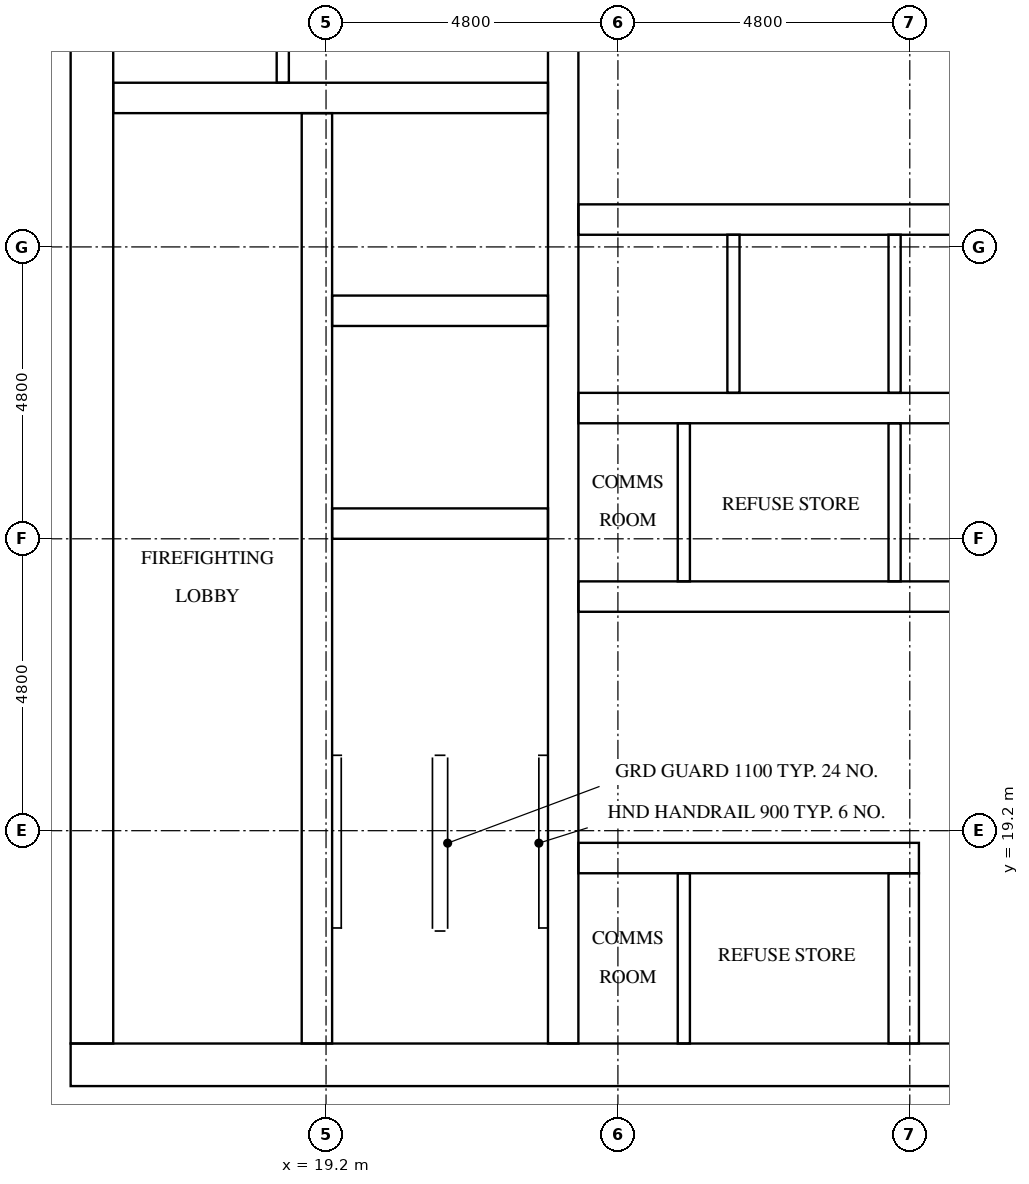
"""IFC4 building model, lengths in metres.
Left out: names, types, materials, properties, quantities, classifications, styles, units other than length and angle.
Written with IfcOpenShell. Run it as: python <this file> out.ifc"""

import sys

from ifc_helpers import new_model, si_unit, direction, frame, frame_2d, origin, place, context, subcontext, project, spatial, rectangle, extrude, element, fill, save


model = new_model("IFC4")
c1 = context("Model", 3, precision=1e-05, world=origin(), true_north=direction((0.0, 1.0)))
c2 = subcontext(c1, "Body", "Model", "MODEL_VIEW")
j1 = project(units=[si_unit("LENGTHUNIT", "METRE"), si_unit("PLANEANGLEUNIT", "RADIAN")], contexts=[c1])
p1 = place(None, origin())
s1 = spatial("IfcSite", under=j1, at=p1, CompositionType="ELEMENT")
p2 = place(p1, origin())
s2 = spatial("IfcBuilding", under=s1, at=p2, CompositionType="ELEMENT")
p3 = place(p2, frame((0.0, 0.0, 212.3)))
s3 = spatial("IfcBuildingStorey", under=s2, at=p3, CompositionType="ELEMENT", Elevation=212.3)
p4 = place(p3, frame((15.0, 15.35, 0.0), z_axis=(0.0, 0.0, 1.0), x_axis=(1.0, 0.0, 0.0)))
e1 = element("IfcWall", 1, at=p4, inside=s3, PredefinedType="SHEAR", context=c2, shape_type="SweptSolid", body=[
    extrude(rectangle(XDim=32.4, YDim=0.7, at=frame_2d((16.2, 0.0))), origin(), (0.0, 0.0, 1.0), 3.2),
])
p5 = place(p4, frame((15.3, 0.0, 0.0)))
e2 = element("IfcOpeningElement", 2, at=p5, cuts=e1, PredefinedType="OPENING", context=c2, shape_type="SweptSolid", body=[
    extrude(rectangle(XDim=1.8, YDim=2.1, at=frame_2d((0.9, 1.05))), frame((0.0, 0.36, 0.0), z_axis=(0.0, -1.0, 0.0), x_axis=(1.0, 0.0, 0.0)), (0.0, 0.0, 1.0), 0.72),
])
p6 = place(p3, frame((15.35, 15.7, 0.0), z_axis=(0.0, 0.0, 1.0), x_axis=(0.0, 1.0, 0.0)))
e3 = element("IfcWall", 3, at=p6, inside=s3, PredefinedType="SHEAR", context=c2, shape_type="SweptSolid", body=[
    extrude(rectangle(XDim=21.4, YDim=0.7, at=frame_2d((10.7, 0.0))), origin(), (0.0, 0.0, 1.0), 3.2),
])
p7 = place(p6, frame((5.06, 0.0, 0.0)))
e4 = element("IfcOpeningElement", 4, at=p7, cuts=e3, PredefinedType="OPENING", context=c2, shape_type="SweptSolid", body=[
    extrude(rectangle(XDim=1.2, YDim=2.1, at=frame_2d((0.6, 1.05))), frame((0.0, 0.36, 0.0), z_axis=(0.0, -1.0, 0.0), x_axis=(1.0, 0.0, 0.0)), (0.0, 0.0, 1.0), 0.72),
])
p8 = place(p3, frame((19.05, 15.7, 0.0), z_axis=(0.0, 0.0, 1.0), x_axis=(0.0, 1.0, 0.0)))
e5 = element("IfcWall", 5, at=p8, inside=s3, PredefinedType="SHEAR", context=c2, shape_type="SweptSolid", body=[
    extrude(rectangle(XDim=15.3, YDim=0.5, at=frame_2d((7.65, 0.0))), origin(), (0.0, 0.0, 1.0), 3.2),
])
p9 = place(p8, frame((9.75, 0.0, 0.0)))
e6 = element("IfcOpeningElement", 6, at=p9, cuts=e5, PredefinedType="OPENING", context=c2, shape_type="SweptSolid", body=[
    extrude(rectangle(XDim=1.1, YDim=2.1, at=frame_2d((0.55, 1.05))), frame((0.0, 0.26, 0.0), z_axis=(0.0, -1.0, 0.0), x_axis=(1.0, 0.0, 0.0)), (0.0, 0.0, 1.0), 0.52),
])
p10 = place(p8, frame((13.25, 0.0, 0.0)))
e7 = element("IfcOpeningElement", 7, at=p10, cuts=e5, PredefinedType="OPENING", context=c2, shape_type="SweptSolid", body=[
    extrude(rectangle(XDim=1.1, YDim=2.1, at=frame_2d((0.55, 1.05))), frame((0.0, 0.26, 0.0), z_axis=(0.0, -1.0, 0.0), x_axis=(1.0, 0.0, 0.0)), (0.0, 0.0, 1.0), 0.52),
])
p11 = place(p8, frame((0.5, 0.0, 0.0)))
e8 = element("IfcOpeningElement", 8, at=p11, cuts=e5, PredefinedType="OPENING", context=c2, shape_type="SweptSolid", body=[
    extrude(rectangle(XDim=1.2, YDim=2.1, at=frame_2d((0.6, 1.05))), frame((0.0, 0.26, 0.0), z_axis=(0.0, -1.0, 0.0), x_axis=(1.0, 0.0, 0.0)), (0.0, 0.0, 1.0), 0.52),
])
p12 = place(p3, frame((23.1, 15.7, 0.0), z_axis=(0.0, 0.0, 1.0), x_axis=(0.0, 1.0, 0.0)))
e9 = element("IfcWall", 9, at=p12, inside=s3, PredefinedType="SHEAR", context=c2, shape_type="SweptSolid", body=[
    extrude(rectangle(XDim=21.4, YDim=0.5, at=frame_2d((10.7, 0.0))), origin(), (0.0, 0.0, 1.0), 3.2),
])
for number, where, z_axis, x_axis in (
    (10, (19.3, 24.25, 0.0), (0.0, 0.0, 1.0), (1.0, 0.0, 0.0)),
    (11, (19.3, 27.75, 0.0), (0.0, 0.0, 1.0), (1.0, 0.0, 0.0)),
):
    element("IfcWall", number, at=place(p3, frame(where, z_axis=z_axis, x_axis=x_axis)), inside=s3, PredefinedType="SHEAR", context=c2, shape_type="SweptSolid", body=[
        extrude(rectangle(XDim=3.55, YDim=0.5, at=frame_2d((1.775, 0.0))), origin(), (0.0, 0.0, 1.0), 3.2),
    ])
p13 = place(p3, frame((15.7, 31.25, 0.0), z_axis=(0.0, 0.0, 1.0), x_axis=(1.0, 0.0, 0.0)))
e12 = element("IfcWall", 12, at=p13, inside=s3, PredefinedType="SHEAR", context=c2, shape_type="SweptSolid", body=[
    extrude(rectangle(XDim=7.15, YDim=0.5, at=frame_2d((3.575, 0.0))), origin(), (0.0, 0.0, 1.0), 3.2),
])
p14 = place(p3, frame((23.35, 18.75, 0.0), z_axis=(0.0, 0.0, 1.0), x_axis=(1.0, 0.0, 0.0)))
e13 = element("IfcWall", 13, at=p14, inside=s3, PredefinedType="SHEAR", context=c2, shape_type="SweptSolid", body=[
    extrude(rectangle(XDim=5.6, YDim=0.5, at=frame_2d((2.8, 0.0))), origin(), (0.0, 0.0, 1.0), 3.2),
])
p15 = place(p14, frame((0.317, 0.0, 0.0)))
e14 = element("IfcOpeningElement", 14, at=p15, cuts=e13, PredefinedType="OPENING", context=c2, shape_type="SweptSolid", body=[
    extrude(rectangle(XDim=1.0, YDim=2.1, at=frame_2d((0.5, 1.05))), frame((0.0, 0.26, 0.0), z_axis=(0.0, -1.0, 0.0), x_axis=(1.0, 0.0, 0.0)), (0.0, 0.0, 1.0), 0.52),
])
p16 = place(p14, frame((2.967, 0.0, 0.0)))
e15 = element("IfcOpeningElement", 15, at=p16, cuts=e13, PredefinedType="OPENING", context=c2, shape_type="SweptSolid", body=[
    extrude(rectangle(XDim=1.0, YDim=2.1, at=frame_2d((0.5, 1.05))), frame((0.0, 0.26, 0.0), z_axis=(0.0, -1.0, 0.0), x_axis=(1.0, 0.0, 0.0)), (0.0, 0.0, 1.0), 0.52),
])
p17 = place(p3, frame((23.35, 23.05, 0.0), z_axis=(0.0, 0.0, 1.0), x_axis=(1.0, 0.0, 0.0)))
e16 = element("IfcWall", 16, at=p17, inside=s3, PredefinedType="SHEAR", context=c2, shape_type="SweptSolid", body=[
    extrude(rectangle(XDim=15.7, YDim=0.5, at=frame_2d((7.85, 0.0))), origin(), (0.0, 0.0, 1.0), 3.2),
])
p18 = place(p17, frame((0.317, 0.0, 0.0)))
e17 = element("IfcOpeningElement", 17, at=p18, cuts=e16, PredefinedType="OPENING", context=c2, shape_type="SweptSolid", body=[
    extrude(rectangle(XDim=1.0, YDim=2.1, at=frame_2d((0.5, 1.05))), frame((0.0, 0.26, 0.0), z_axis=(0.0, -1.0, 0.0), x_axis=(1.0, 0.0, 0.0)), (0.0, 0.0, 1.0), 0.52),
])
p19 = place(p17, frame((2.967, 0.0, 0.0)))
e18 = element("IfcOpeningElement", 18, at=p19, cuts=e16, PredefinedType="OPENING", context=c2, shape_type="SweptSolid", body=[
    extrude(rectangle(XDim=1.0, YDim=2.1, at=frame_2d((0.5, 1.05))), frame((0.0, 0.26, 0.0), z_axis=(0.0, -1.0, 0.0), x_axis=(1.0, 0.0, 0.0)), (0.0, 0.0, 1.0), 0.52),
])
p20 = place(p17, frame((10.917, 0.0, 0.0)))
e19 = element("IfcOpeningElement", 19, at=p20, cuts=e16, PredefinedType="OPENING", context=c2, shape_type="SweptSolid", body=[
    extrude(rectangle(XDim=1.0, YDim=2.1, at=frame_2d((0.5, 1.05))), frame((0.0, 0.26, 0.0), z_axis=(0.0, -1.0, 0.0), x_axis=(1.0, 0.0, 0.0)), (0.0, 0.0, 1.0), 0.52),
])
p21 = place(p17, frame((13.567, 0.0, 0.0)))
e20 = element("IfcOpeningElement", 20, at=p21, cuts=e16, PredefinedType="OPENING", context=c2, shape_type="SweptSolid", body=[
    extrude(rectangle(XDim=1.0, YDim=2.1, at=frame_2d((0.5, 1.05))), frame((0.0, 0.26, 0.0), z_axis=(0.0, -1.0, 0.0), x_axis=(1.0, 0.0, 0.0)), (0.0, 0.0, 1.0), 0.52),
])
p22 = place(p3, frame((23.35, 26.15, 0.0), z_axis=(0.0, 0.0, 1.0), x_axis=(1.0, 0.0, 0.0)))
e21 = element("IfcWall", 21, at=p22, inside=s3, PredefinedType="SHEAR", context=c2, shape_type="SweptSolid", body=[
    extrude(rectangle(XDim=15.7, YDim=0.5, at=frame_2d((7.85, 0.0))), origin(), (0.0, 0.0, 1.0), 3.2),
])
p23 = place(p3, frame((23.35, 29.25, 0.0), z_axis=(0.0, 0.0, 1.0), x_axis=(1.0, 0.0, 0.0)))
e22 = element("IfcWall", 22, at=p23, inside=s3, PredefinedType="SHEAR", context=c2, shape_type="SweptSolid", body=[
    extrude(rectangle(XDim=15.7, YDim=0.5, at=frame_2d((7.85, 0.0))), origin(), (0.0, 0.0, 1.0), 3.2),
])
p24 = place(p23, frame((0.675, 0.0, 0.0)))
e23 = element("IfcOpeningElement", 23, at=p24, cuts=e22, PredefinedType="OPENING", context=c2, shape_type="SweptSolid", body=[
    extrude(rectangle(XDim=1.1, YDim=2.1, at=frame_2d((0.55, 1.05))), frame((0.0, 0.26, 0.0), z_axis=(0.0, -1.0, 0.0), x_axis=(1.0, 0.0, 0.0)), (0.0, 0.0, 1.0), 0.52),
])
p25 = place(p23, frame((3.325, 0.0, 0.0)))
e24 = element("IfcOpeningElement", 24, at=p25, cuts=e22, PredefinedType="OPENING", context=c2, shape_type="SweptSolid", body=[
    extrude(rectangle(XDim=1.1, YDim=2.1, at=frame_2d((0.55, 1.05))), frame((0.0, 0.26, 0.0), z_axis=(0.0, -1.0, 0.0), x_axis=(1.0, 0.0, 0.0)), (0.0, 0.0, 1.0), 0.52),
])
p26 = place(p23, frame((5.975, 0.0, 0.0)))
e25 = element("IfcOpeningElement", 25, at=p26, cuts=e22, PredefinedType="OPENING", context=c2, shape_type="SweptSolid", body=[
    extrude(rectangle(XDim=1.1, YDim=2.1, at=frame_2d((0.55, 1.05))), frame((0.0, 0.26, 0.0), z_axis=(0.0, -1.0, 0.0), x_axis=(1.0, 0.0, 0.0)), (0.0, 0.0, 1.0), 0.52),
])
p27 = place(p23, frame((8.625, 0.0, 0.0)))
e26 = element("IfcOpeningElement", 26, at=p27, cuts=e22, PredefinedType="OPENING", context=c2, shape_type="SweptSolid", body=[
    extrude(rectangle(XDim=1.1, YDim=2.1, at=frame_2d((0.55, 1.05))), frame((0.0, 0.26, 0.0), z_axis=(0.0, -1.0, 0.0), x_axis=(1.0, 0.0, 0.0)), (0.0, 0.0, 1.0), 0.52),
])
p28 = place(p23, frame((11.275, 0.0, 0.0)))
e27 = element("IfcOpeningElement", 27, at=p28, cuts=e22, PredefinedType="OPENING", context=c2, shape_type="SweptSolid", body=[
    extrude(rectangle(XDim=1.1, YDim=2.1, at=frame_2d((0.55, 1.05))), frame((0.0, 0.26, 0.0), z_axis=(0.0, -1.0, 0.0), x_axis=(1.0, 0.0, 0.0)), (0.0, 0.0, 1.0), 0.52),
])
p29 = place(p23, frame((13.925, 0.0, 0.0)))
e28 = element("IfcOpeningElement", 28, at=p29, cuts=e22, PredefinedType="OPENING", context=c2, shape_type="SweptSolid", body=[
    extrude(rectangle(XDim=1.1, YDim=2.1, at=frame_2d((0.55, 1.05))), frame((0.0, 0.26, 0.0), z_axis=(0.0, -1.0, 0.0), x_axis=(1.0, 0.0, 0.0)), (0.0, 0.0, 1.0), 0.52),
])
p30 = place(p3, frame((28.7, 15.7, 0.0), z_axis=(0.0, 0.0, 1.0), x_axis=(0.0, 1.0, 0.0)))
e29 = element("IfcWall", 29, at=p30, inside=s3, PredefinedType="SHEAR", context=c2, shape_type="SweptSolid", body=[
    extrude(rectangle(XDim=2.8, YDim=0.5, at=frame_2d((1.4, 0.0))), origin(), (0.0, 0.0, 1.0), 3.2),
])
p31 = place(p3, frame((25.9, 26.4, 0.0), z_axis=(0.0, 0.0, 1.0), x_axis=(0.0, 1.0, 0.0)))
e30 = element("IfcWall", 30, at=p31, inside=s3, PredefinedType="SOLIDWALL", context=c2, shape_type="SweptSolid", body=[
    extrude(rectangle(XDim=2.6, YDim=0.2, at=frame_2d((1.3, 0.0))), origin(), (0.0, 0.0, 1.0), 3.2),
])
p32 = place(p3, frame((28.55, 23.3, 0.0), z_axis=(0.0, 0.0, 1.0), x_axis=(0.0, 1.0, 0.0)))
e31 = element("IfcWall", 31, at=p32, inside=s3, PredefinedType="SOLIDWALL", context=c2, shape_type="SweptSolid", body=[
    extrude(rectangle(XDim=2.6, YDim=0.2, at=frame_2d((1.3, 0.0))), origin(), (0.0, 0.0, 1.0), 3.2),
])
p33 = place(p3, frame((28.55, 26.4, 0.0), z_axis=(0.0, 0.0, 1.0), x_axis=(0.0, 1.0, 0.0)))
e32 = element("IfcWall", 32, at=p33, inside=s3, PredefinedType="SOLIDWALL", context=c2, shape_type="SweptSolid", body=[
    extrude(rectangle(XDim=2.6, YDim=0.2, at=frame_2d((1.3, 0.0))), origin(), (0.0, 0.0, 1.0), 3.2),
])
p34 = place(p3, frame((18.489, 31.5, 0.0), z_axis=(0.0, 0.0, 1.0), x_axis=(0.0, 1.0, 0.0)))
e33 = element("IfcWall", 33, at=p34, inside=s3, PredefinedType="PARTITIONING", context=c2, shape_type="SweptSolid", body=[
    extrude(rectangle(XDim=5.6, YDim=0.2, at=frame_2d((2.8, 0.0))), origin(), (0.0, 0.0, 1.0), 3.2),
])
p35 = place(p3, frame((25.084, 23.3, 0.0), z_axis=(0.0, 0.0, 1.0), x_axis=(0.0, 1.0, 0.0)))
e34 = element("IfcWall", 34, at=p35, inside=s3, PredefinedType="PARTITIONING", context=c2, shape_type="SweptSolid", body=[
    extrude(rectangle(XDim=2.6, YDim=0.2, at=frame_2d((1.3, 0.0))), origin(), (0.0, 0.0, 1.0), 3.2),
])
p36 = place(p3, frame((25.084, 15.7, 0.0), z_axis=(0.0, 0.0, 1.0), x_axis=(0.0, 1.0, 0.0)))
e35 = element("IfcWall", 35, at=p36, inside=s3, PredefinedType="PARTITIONING", context=c2, shape_type="SweptSolid", body=[
    extrude(rectangle(XDim=2.8, YDim=0.2, at=frame_2d((1.4, 0.0))), origin(), (0.0, 0.0, 1.0), 3.2),
])
p37 = place(p24, origin())
e36 = element("IfcDoor", 36, at=p37, inside=s3, OperationType="DOUBLE_DOOR_SLIDING", PredefinedType="DOOR", context=c2, shape_type="SweptSolid", body=[
    extrude(rectangle(XDim=1.1, YDim=2.1, at=frame_2d((0.55, 1.05))), frame((0.0, 0.025, 0.0), z_axis=(0.0, -1.0, 0.0), x_axis=(1.0, 0.0, 0.0)), (0.0, 0.0, 1.0), 0.05),
])
fill(e23, e36)
p38 = place(p25, origin())
e37 = element("IfcDoor", 37, at=p38, inside=s3, OperationType="DOUBLE_DOOR_SLIDING", PredefinedType="DOOR", context=c2, shape_type="SweptSolid", body=[
    extrude(rectangle(XDim=1.1, YDim=2.1, at=frame_2d((0.55, 1.05))), frame((0.0, 0.025, 0.0), z_axis=(0.0, -1.0, 0.0), x_axis=(1.0, 0.0, 0.0)), (0.0, 0.0, 1.0), 0.05),
])
fill(e24, e37)
p39 = place(p26, origin())
e38 = element("IfcDoor", 38, at=p39, inside=s3, OperationType="DOUBLE_DOOR_SLIDING", PredefinedType="DOOR", context=c2, shape_type="SweptSolid", body=[
    extrude(rectangle(XDim=1.1, YDim=2.1, at=frame_2d((0.55, 1.05))), frame((0.0, 0.025, 0.0), z_axis=(0.0, -1.0, 0.0), x_axis=(1.0, 0.0, 0.0)), (0.0, 0.0, 1.0), 0.05),
])
fill(e25, e38)
p40 = place(p9, origin())
e39 = element("IfcDoor", 39, at=p40, inside=s3, OperationType="DOUBLE_DOOR_SLIDING", PredefinedType="DOOR", context=c2, shape_type="SweptSolid", body=[
    extrude(rectangle(XDim=1.1, YDim=2.1, at=frame_2d((0.55, 1.05))), frame((0.0, 0.025, 0.0), z_axis=(0.0, -1.0, 0.0), x_axis=(1.0, 0.0, 0.0)), (0.0, 0.0, 1.0), 0.05),
])
fill(e6, e39)
p41 = place(p10, origin())
e40 = element("IfcDoor", 40, at=p41, inside=s3, OperationType="DOUBLE_DOOR_SLIDING", PredefinedType="DOOR", context=c2, shape_type="SweptSolid", body=[
    extrude(rectangle(XDim=1.1, YDim=2.1, at=frame_2d((0.55, 1.05))), frame((0.0, 0.025, 0.0), z_axis=(0.0, -1.0, 0.0), x_axis=(1.0, 0.0, 0.0)), (0.0, 0.0, 1.0), 0.05),
])
fill(e7, e40)
p42 = place(p11, frame((1.2, 0.0, 0.0), z_axis=(0.0, 0.0, 1.0), x_axis=(-1.0, 0.0, 0.0)))
e41 = element("IfcDoor", 41, at=p42, inside=s3, OperationType="SINGLE_SWING_LEFT", PredefinedType="DOOR", context=c2, shape_type="SweptSolid", body=[
    extrude(rectangle(XDim=1.2, YDim=2.1, at=frame_2d((0.6, 1.05))), frame((0.0, 0.025, 0.0), z_axis=(0.0, -1.0, 0.0), x_axis=(1.0, 0.0, 0.0)), (0.0, 0.0, 1.0), 0.05),
])
fill(e8, e41)
p43 = place(p7, frame((1.2, 0.0, 0.0), z_axis=(0.0, 0.0, 1.0), x_axis=(-1.0, 0.0, 0.0)))
e42 = element("IfcDoor", 42, at=p43, inside=s3, OperationType="SINGLE_SWING_RIGHT", PredefinedType="DOOR", context=c2, shape_type="SweptSolid", body=[
    extrude(rectangle(XDim=1.2, YDim=2.1, at=frame_2d((0.6, 1.05))), frame((0.0, 0.025, 0.0), z_axis=(0.0, -1.0, 0.0), x_axis=(1.0, 0.0, 0.0)), (0.0, 0.0, 1.0), 0.05),
])
fill(e4, e42)
p44 = place(p18, frame((1.0, 0.0, 0.0), z_axis=(0.0, 0.0, 1.0), x_axis=(-1.0, 0.0, 0.0)))
e43 = element("IfcDoor", 43, at=p44, inside=s3, OperationType="SINGLE_SWING_RIGHT", PredefinedType="DOOR", context=c2, shape_type="SweptSolid", body=[
    extrude(rectangle(XDim=1.0, YDim=2.1, at=frame_2d((0.5, 1.05))), frame((0.0, 0.025, 0.0), z_axis=(0.0, -1.0, 0.0), x_axis=(1.0, 0.0, 0.0)), (0.0, 0.0, 1.0), 0.05),
])
fill(e17, e43)
p45 = place(p19, frame((1.0, 0.0, 0.0), z_axis=(0.0, 0.0, 1.0), x_axis=(-1.0, 0.0, 0.0)))
e44 = element("IfcDoor", 44, at=p45, inside=s3, OperationType="SINGLE_SWING_LEFT", PredefinedType="DOOR", context=c2, shape_type="SweptSolid", body=[
    extrude(rectangle(XDim=1.0, YDim=2.1, at=frame_2d((0.5, 1.05))), frame((0.0, 0.025, 0.0), z_axis=(0.0, -1.0, 0.0), x_axis=(1.0, 0.0, 0.0)), (0.0, 0.0, 1.0), 0.05),
])
fill(e18, e44)
p46 = place(p15, origin())
e45 = element("IfcDoor", 45, at=p46, inside=s3, OperationType="SINGLE_SWING_RIGHT", PredefinedType="DOOR", context=c2, shape_type="SweptSolid", body=[
    extrude(rectangle(XDim=1.0, YDim=2.1, at=frame_2d((0.5, 1.05))), frame((0.0, 0.025, 0.0), z_axis=(0.0, -1.0, 0.0), x_axis=(1.0, 0.0, 0.0)), (0.0, 0.0, 1.0), 0.05),
])
fill(e14, e45)
p47 = place(p16, origin())
e46 = element("IfcDoor", 46, at=p47, inside=s3, OperationType="SINGLE_SWING_LEFT", PredefinedType="DOOR", context=c2, shape_type="SweptSolid", body=[
    extrude(rectangle(XDim=1.0, YDim=2.1, at=frame_2d((0.5, 1.05))), frame((0.0, 0.025, 0.0), z_axis=(0.0, -1.0, 0.0), x_axis=(1.0, 0.0, 0.0)), (0.0, 0.0, 1.0), 0.05),
])
fill(e15, e46)
save(model, sys.argv[1])
